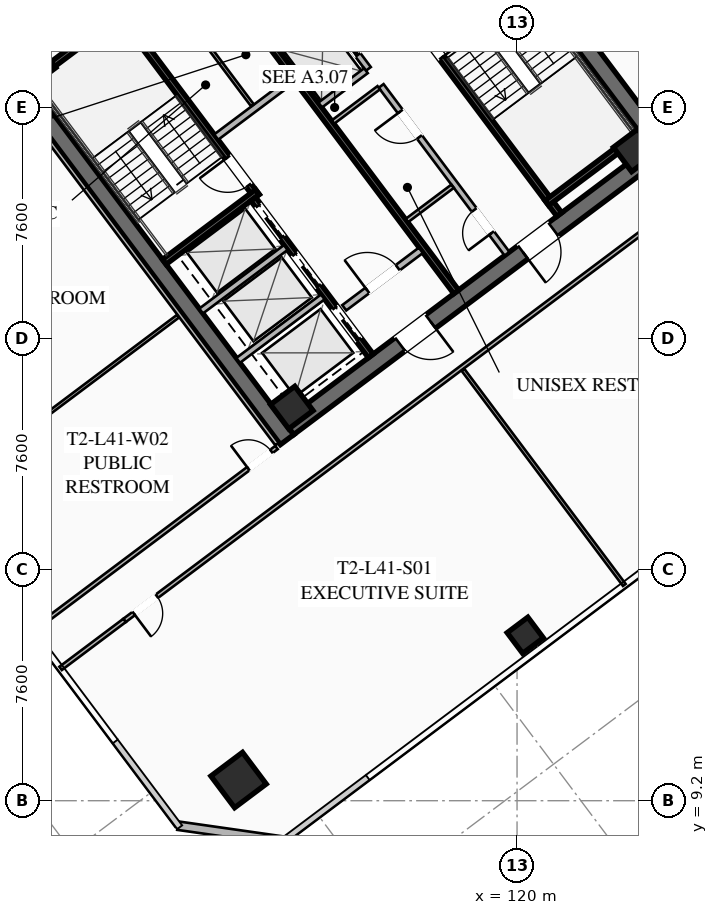
"""IFC4 building model, lengths in metres.
Left out: names, types, materials, properties, quantities, classifications, styles, units other than length and angle.
Written with IfcOpenShell. Run it as: python <this file> out.ifc"""

import sys

from ifc_helpers import new_model, si_unit, direction, frame, frame_2d, origin, origin_2d, place, context, subcontext, project, spatial, rectangle, hollow_rectangle, extrude, element, fill, save


model = new_model("IFC4")
c1 = context("Model", 3, precision=1e-05, world=origin(), true_north=direction((0.0, 1.0)))
c2 = subcontext(c1, "Body", "Model", "MODEL_VIEW")
j1 = project(units=[si_unit("LENGTHUNIT", "METRE"), si_unit("PLANEANGLEUNIT", "RADIAN")], contexts=[c1])
p1 = place(None, origin())
s1 = spatial("IfcSite", under=j1, at=p1, CompositionType="ELEMENT")
p2 = place(p1, origin())
s2 = spatial("IfcBuilding", under=s1, at=p2, CompositionType="ELEMENT")
p3 = place(p2, frame((0.0, 0.0, 153.45)))
s3 = spatial("IfcBuildingStorey", under=s2, at=p3, CompositionType="ELEMENT", Elevation=153.45)
for number, where, z_axis, x_axis in (
    (1, (112.436, 21.077, 0.0), (0.0, 0.0, 1.0), (-0.6, 0.8, 0.0)),
    (2, (115.564, 42.923, 0.0), (0.0, 0.0, 1.0), (0.6, -0.8, 0.0)),
):
    element("IfcWall", number, at=place(p3, frame(where, z_axis=z_axis, x_axis=x_axis)), inside=s3, PredefinedType="SHEAR", context=c2, shape_type="SweptSolid", body=[
        extrude(rectangle(XDim=15.6, YDim=0.55, at=frame_2d((7.8, 0.0))), origin(), (0.0, 0.0, 1.0), 3.55),
    ])
p4 = place(p3, frame((124.539, 30.498, 0.0), z_axis=(0.0, 0.0, 1.0), x_axis=(-0.799998054672, -0.600002593761, 0.0)))
e3 = element("IfcWall", 3, at=p4, inside=s3, PredefinedType="SHEAR", context=c2, shape_type="SweptSolid", body=[
    extrude(rectangle(XDim=15.06, YDim=0.55, at=frame_2d((7.53, 0.0))), origin(), (0.0, 0.0, 1.0), 3.55),
])
p5 = place(p4, frame((9.23, 0.0, 0.0)))
e4 = element("IfcOpeningElement", 4, at=p5, cuts=e3, PredefinedType="OPENING", context=c2, shape_type="SweptSolid", body=[
    extrude(rectangle(XDim=1.25, YDim=2.25, at=frame_2d((0.625, 1.125))), frame((0.0, 0.285, 0.0), z_axis=(0.0, -1.0, 0.0), x_axis=(1.0, 0.0, 0.0)), (0.0, 0.0, 1.0), 0.57),
])
p6 = place(p4, frame((4.18, 0.0, 0.0)))
e5 = element("IfcOpeningElement", 5, at=p6, cuts=e3, PredefinedType="OPENING", context=c2, shape_type="SweptSolid", body=[
    extrude(rectangle(XDim=1.25, YDim=2.25, at=frame_2d((0.625, 1.125))), frame((0.0, 0.285, 0.0), z_axis=(0.0, -1.0, 0.0), x_axis=(1.0, 0.0, 0.0)), (0.0, 0.0, 1.0), 0.57),
])
p7 = place(p3, frame((103.461, 33.502, 0.0), z_axis=(0.0, 0.0, 1.0), x_axis=(0.799998054672, 0.600002593761, 0.0)))
e6 = element("IfcWall", 6, at=p7, inside=s3, PredefinedType="SHEAR", context=c2, shape_type="SweptSolid", body=[
    extrude(rectangle(XDim=15.06, YDim=0.55, at=frame_2d((7.53, 0.0))), origin(), (0.0, 0.0, 1.0), 3.55),
])
p8 = place(p7, frame((4.58, 0.0, 0.0)))
e7 = element("IfcOpeningElement", 7, at=p8, cuts=e6, PredefinedType="OPENING", context=c2, shape_type="SweptSolid", body=[
    extrude(rectangle(XDim=1.25, YDim=2.25, at=frame_2d((0.625, 1.125))), frame((0.0, 0.285, 0.0), z_axis=(0.0, -1.0, 0.0), x_axis=(1.0, 0.0, 0.0)), (0.0, 0.0, 1.0), 0.57),
])
p9 = place(p7, frame((9.63, 0.0, 0.0)))
e8 = element("IfcOpeningElement", 8, at=p9, cuts=e6, PredefinedType="OPENING", context=c2, shape_type="SweptSolid", body=[
    extrude(rectangle(XDim=1.25, YDim=2.25, at=frame_2d((0.625, 1.125))), frame((0.0, 0.285, 0.0), z_axis=(0.0, -1.0, 0.0), x_axis=(1.0, 0.0, 0.0)), (0.0, 0.0, 1.0), 0.57),
])
for number, where, z_axis, x_axis in (
    (9, (112.59, 22.13, 0.0), (0.0, 0.0, 1.0), (0.8, 0.6, 0.0)),
    (10, (123.87, 30.59, 0.0), (0.0, 0.0, 1.0), (0.8, 0.6, 0.0)),
    (11, (104.13, 33.41, 0.0), (0.0, 0.0, 1.0), (0.8, 0.6, 0.0)),
):
    element("IfcColumn", number, at=place(p3, frame(where, z_axis=z_axis, x_axis=x_axis)), inside=s3, PredefinedType="COLUMN", context=c2, shape_type="SweptSolid", body=[
        extrude(hollow_rectangle(XDim=1.0, YDim=1.0, WallThickness=0.04, at=origin_2d()), origin(), (0.0, 0.0, 1.0), 3.37),
    ])
p10 = place(p3, frame((110.84, 9.88, 0.0), z_axis=(0.0, 0.0, 1.0), x_axis=(0.799999996291, 0.600000004945, 0.0)))
e12 = element("IfcColumn", 12, at=p10, inside=s3, PredefinedType="COLUMN", context=c2, shape_type="SweptSolid", body=[
    extrude(hollow_rectangle(XDim=1.3, YDim=1.3, WallThickness=0.05, at=origin_2d()), origin(), (0.0, 0.0, 1.0), 3.37),
])
p11 = place(p3, frame((120.27, 14.64, 0.0), z_axis=(0.0, 0.0, 1.0), x_axis=(0.799999996291, 0.600000004945, 0.0)))
e13 = element("IfcColumn", 13, at=p11, inside=s3, PredefinedType="COLUMN", context=c2, shape_type="SweptSolid", body=[
    extrude(hollow_rectangle(XDim=0.85, YDim=0.85, WallThickness=0.035, at=origin_2d()), origin(), (0.0, 0.0, 1.0), 3.37),
])
p12 = place(p3, frame((112.34, 7.88, 0.0), z_axis=(0.0, 0.0, 1.0), x_axis=(-0.989949493661, 0.141421356237, 0.0)))
e14 = element("IfcWall", 14, at=p12, inside=s3, PredefinedType="SOLIDWALL", context=c2, shape_type="SweptSolid", body=[
    extrude(rectangle(XDim=3.536, YDim=0.28, at=frame_2d((1.768, 0.0))), origin(), (0.0, 0.0, 1.0), 3.37),
])
p13 = place(p3, frame((111.44, 29.08, 0.0), z_axis=(0.0, 0.0, 1.0), x_axis=(-0.59999029481, 0.8000072788, 0.0)))
e15 = element("IfcWall", 15, at=p13, inside=s3, PredefinedType="SHEAR", context=c2, shape_type="SweptSolid", body=[
    extrude(rectangle(XDim=8.05, YDim=0.2, at=frame_2d((4.025, 0.0))), origin(), (0.0, 0.0, 1.0), 3.37),
])
p14 = place(p13, frame((0.45, 0.0, 0.0)))
e16 = element("IfcOpeningElement", 16, at=p14, cuts=e15, PredefinedType="OPENING", context=c2, shape_type="SweptSolid", body=[
    extrude(rectangle(XDim=1.15, YDim=2.2, at=frame_2d((0.575, 1.1))), frame((0.0, 0.11, 0.0), z_axis=(0.0, -1.0, 0.0), x_axis=(1.0, 0.0, 0.0)), (0.0, 0.0, 1.0), 0.22),
])
for number, where, z_axis, x_axis in (
    (17, (108.396, 26.922, 0.0), (0.0, 0.0, 1.0), (0.8, 0.6, 0.0)),
    (18, (103.956, 32.842, 0.0), (0.0, 0.0, 1.0), (0.8, 0.6, 0.0)),
):
    element("IfcWall", number, at=place(p3, frame(where, z_axis=z_axis, x_axis=x_axis)), inside=s3, PredefinedType="SHEAR", context=c2, shape_type="SweptSolid", body=[
        extrude(rectangle(XDim=3.83, YDim=0.2, at=frame_2d((1.915, 0.0))), origin(), (0.0, 0.0, 1.0), 3.37),
    ])
p15 = place(p3, frame((116.56, 34.92, 0.0), z_axis=(0.0, 0.0, 1.0), x_axis=(0.59999029481, -0.8000072788, 0.0)))
e19 = element("IfcWall", 19, at=p15, inside=s3, PredefinedType="SHEAR", context=c2, shape_type="SweptSolid", body=[
    extrude(rectangle(XDim=8.05, YDim=0.2, at=frame_2d((4.025, 0.0))), origin(), (0.0, 0.0, 1.0), 3.37),
])
p16 = place(p15, frame((0.45, 0.0, 0.0)))
e20 = element("IfcOpeningElement", 20, at=p16, cuts=e19, PredefinedType="OPENING", context=c2, shape_type="SweptSolid", body=[
    extrude(rectangle(XDim=1.15, YDim=2.2, at=frame_2d((0.575, 1.1))), frame((0.0, 0.11, 0.0), z_axis=(0.0, -1.0, 0.0), x_axis=(1.0, 0.0, 0.0)), (0.0, 0.0, 1.0), 0.22),
])
p17 = place(p3, frame((120.98, 28.86, 0.0), z_axis=(0.0, 0.0, 1.0), x_axis=(0.800015298837, 0.599979601008, 0.0)))
e21 = element("IfcWall", 21, at=p17, inside=s3, PredefinedType="SHEAR", context=c2, shape_type="SweptSolid", body=[
    extrude(rectangle(XDim=3.83, YDim=0.2, at=frame_2d((1.915, 0.0))), origin(), (0.0, 0.0, 1.0), 3.37),
])
p18 = place(p3, frame((117.998, 25.936, 0.0), z_axis=(0.0, 0.0, 1.0), x_axis=(-0.600002693989, 0.799997979501, 0.0)))
e22 = element("IfcWall", 22, at=p18, inside=s3, PredefinedType="SHEAR", context=c2, shape_type="SweptSolid", body=[
    extrude(rectangle(XDim=14.5, YDim=0.2, at=frame_2d((7.25, 0.0))), origin(), (0.0, 0.0, 1.0), 3.37),
])
p19 = place(p3, frame((110.104, 31.028, 0.0), z_axis=(0.0, 0.0, 1.0), x_axis=(0.800018601094, 0.59997519774, 0.0)))
e23 = element("IfcWall", 23, at=p19, inside=s3, PredefinedType="SOLIDWALL", context=c2, shape_type="SweptSolid", body=[
    extrude(rectangle(XDim=3.15, YDim=0.22, at=frame_2d((1.575, 0.0))), origin(), (0.0, 0.0, 1.0), 2.513),
])
p20 = place(p3, frame((114.316, 25.412, 0.0), z_axis=(0.0, 0.0, 1.0), x_axis=(0.800018601094, 0.59997519774, 0.0)))
e24 = element("IfcWall", 24, at=p20, inside=s3, PredefinedType="SOLIDWALL", context=c2, shape_type="SweptSolid", body=[
    extrude(rectangle(XDim=3.15, YDim=0.22, at=frame_2d((1.575, 0.0))), origin(), (0.0, 0.0, 1.0), 2.513),
])
p21 = place(p20, frame((0.95, 0.0, 0.0)))
e25 = element("IfcOpeningElement", 25, at=p21, cuts=e24, PredefinedType="OPENING", context=c2, shape_type="SweptSolid", body=[
    extrude(rectangle(XDim=1.25, YDim=2.25, at=frame_2d((0.625, 1.125))), frame((0.0, 0.12, 0.0), z_axis=(0.0, -1.0, 0.0), x_axis=(1.0, 0.0, 0.0)), (0.0, 0.0, 1.0), 0.24),
])
p22 = place(p3, frame((115.19, 23.83, 0.0), z_axis=(0.0, 0.0, 1.0), x_axis=(-0.599993943644, 0.800004542231, 0.0)))
e26 = element("IfcWall", 26, at=p22, inside=s3, PredefinedType="SHEAR", context=c2, shape_type="SweptSolid", body=[
    extrude(rectangle(XDim=6.45, YDim=0.2, at=frame_2d((3.225, 0.0))), origin(), (0.0, 0.0, 1.0), 3.37),
])
p23 = place(p22, frame((4.875, 0.0, 0.0)))
e27 = element("IfcOpeningElement", 27, at=p23, cuts=e26, PredefinedType="OPENING", context=c2, shape_type="SweptSolid", body=[
    extrude(rectangle(XDim=1.3, YDim=2.25, at=frame_2d((0.65, 1.125))), frame((0.0, 0.11, 0.0), z_axis=(0.0, -1.0, 0.0), x_axis=(1.0, 0.0, 0.0)), (0.0, 0.0, 1.0), 0.22),
])
p24 = place(p22, frame((2.875, 0.0, 0.0)))
e28 = element("IfcOpeningElement", 28, at=p24, cuts=e26, PredefinedType="OPENING", context=c2, shape_type="SweptSolid", body=[
    extrude(rectangle(XDim=1.3, YDim=2.25, at=frame_2d((0.65, 1.125))), frame((0.0, 0.11, 0.0), z_axis=(0.0, -1.0, 0.0), x_axis=(1.0, 0.0, 0.0)), (0.0, 0.0, 1.0), 0.22),
])
p25 = place(p22, frame((0.675, 0.0, 0.0)))
e29 = element("IfcOpeningElement", 29, at=p25, cuts=e26, PredefinedType="OPENING", context=c2, shape_type="SweptSolid", body=[
    extrude(rectangle(XDim=1.3, YDim=2.25, at=frame_2d((0.65, 1.125))), frame((0.0, 0.11, 0.0), z_axis=(0.0, -1.0, 0.0), x_axis=(1.0, 0.0, 0.0)), (0.0, 0.0, 1.0), 0.22),
])
for number, where, z_axis, x_axis in (
    (30, (110.826, 23.682, 0.0), (0.0, 0.0, 1.0), (0.8, 0.6, 0.0)),
    (31, (109.608, 25.306, 0.0), (0.0, 0.0, 1.0), (0.8, 0.6, 0.0)),
):
    element("IfcWall", number, at=place(p3, frame(where, z_axis=z_axis, x_axis=x_axis)), inside=s3, PredefinedType="SOLIDWALL", context=c2, shape_type="SweptSolid", body=[
        extrude(rectangle(XDim=3.48, YDim=0.2, at=frame_2d((1.74, 0.0))), origin(), (0.0, 0.0, 1.0), 3.37),
    ])
p26 = place(p3, frame((111.296, 32.072, 0.0), z_axis=(0.0, 0.0, 1.0), x_axis=(-0.59995887973, 0.800030838552, 0.0)))
e32 = element("IfcWall", 32, at=p26, inside=s3, PredefinedType="PARTITIONING", context=c2, shape_type="SweptSolid", body=[
    extrude(rectangle(XDim=3.8, YDim=0.11, at=frame_2d((1.9, 0.0))), origin(), (0.0, 0.0, 1.0), 2.513),
])
p27 = place(p3, frame((119.67, 27.19, 0.0), z_axis=(0.0, 0.0, 1.0), x_axis=(-0.599988677396, 0.800008491828, 0.0)))
e33 = element("IfcWall", 33, at=p27, inside=s3, PredefinedType="SOLIDWALL", context=c2, shape_type="SweptSolid", body=[
    extrude(rectangle(XDim=6.9, YDim=0.2, at=frame_2d((3.45, 0.0))), origin(), (0.0, 0.0, 1.0), 2.513),
])
p28 = place(p27, frame((0.85, 0.0, 0.0)))
e34 = element("IfcOpeningElement", 34, at=p28, cuts=e33, PredefinedType="OPENING", context=c2, shape_type="SweptSolid", body=[
    extrude(rectangle(XDim=0.95, YDim=2.05, at=frame_2d((0.475, 1.025))), frame((0.0, 0.11, 0.0), z_axis=(0.0, -1.0, 0.0), x_axis=(1.0, 0.0, 0.0)), (0.0, 0.0, 1.0), 0.22),
])
p29 = place(p27, frame((4.8, 0.0, 0.0)))
e35 = element("IfcOpeningElement", 35, at=p29, cuts=e33, PredefinedType="OPENING", context=c2, shape_type="SweptSolid", body=[
    extrude(rectangle(XDim=1.05, YDim=2.2, at=frame_2d((0.525, 1.1))), frame((0.0, 0.11, 0.0), z_axis=(0.0, -1.0, 0.0), x_axis=(1.0, 0.0, 0.0)), (0.0, 0.0, 1.0), 0.22),
])
for number, where, z_axis, x_axis in (
    (36, (113.946, 31.522, 0.0), (0.0, 0.0, 1.0), (0.8, 0.6, 0.0)),
    (37, (116.376, 28.282, 0.0), (0.0, 0.0, 1.0), (0.8, 0.6, 0.0)),
):
    element("IfcWall", number, at=place(p3, frame(where, z_axis=z_axis, x_axis=x_axis)), inside=s3, PredefinedType="PARTITIONING", context=c2, shape_type="SweptSolid", body=[
        extrude(rectangle(XDim=1.88, YDim=0.135, at=frame_2d((0.94, 0.0))), origin(), (0.0, 0.0, 1.0), 2.513),
    ])
p30 = place(p3, frame((115.11, 33.27, 0.0), z_axis=(0.0, 0.0, 1.0), x_axis=(-0.600011322243, 0.799991508192, 0.0)))
e38 = element("IfcWall", 38, at=p30, inside=s3, PredefinedType="SOLIDWALL", context=c2, shape_type="SweptSolid", body=[
    extrude(rectangle(XDim=6.9, YDim=0.2, at=frame_2d((3.45, 0.0))), origin(), (0.0, 0.0, 1.0), 3.37),
])
p31 = place(p30, frame((0.575, 0.0, 0.0)))
e39 = element("IfcOpeningElement", 39, at=p31, cuts=e38, PredefinedType="OPENING", context=c2, shape_type="SweptSolid", body=[
    extrude(rectangle(XDim=1.1, YDim=2.2, at=frame_2d((0.55, 1.1))), frame((0.0, 0.11, 0.0), z_axis=(0.0, -1.0, 0.0), x_axis=(1.0, 0.0, 0.0)), (0.0, 0.0, 1.0), 0.22),
])
p32 = place(p30, frame((2.825, 0.0, 0.0)))
e40 = element("IfcOpeningElement", 40, at=p32, cuts=e38, PredefinedType="OPENING", context=c2, shape_type="SweptSolid", body=[
    extrude(rectangle(XDim=1.1, YDim=2.2, at=frame_2d((0.55, 1.1))), frame((0.0, 0.11, 0.0), z_axis=(0.0, -1.0, 0.0), x_axis=(1.0, 0.0, 0.0)), (0.0, 0.0, 1.0), 0.22),
])
p33 = place(p30, frame((5.075, 0.0, 0.0)))
e41 = element("IfcOpeningElement", 41, at=p33, cuts=e38, PredefinedType="OPENING", context=c2, shape_type="SweptSolid", body=[
    extrude(rectangle(XDim=1.1, YDim=2.2, at=frame_2d((0.55, 1.1))), frame((0.0, 0.11, 0.0), z_axis=(0.0, -1.0, 0.0), x_axis=(1.0, 0.0, 0.0)), (0.0, 0.0, 1.0), 0.22),
])
p34 = place(p3, frame((113.526, 32.082, 0.0), z_axis=(0.0, 0.0, 1.0), x_axis=(0.800046745961, 0.599937666993, 0.0)))
e42 = element("IfcWall", 42, at=p34, inside=s3, PredefinedType="SOLIDWALL", context=c2, shape_type="SweptSolid", body=[
    extrude(rectangle(XDim=1.88, YDim=0.2, at=frame_2d((0.94, 0.0))), origin(), (0.0, 0.0, 1.0), 3.37),
])
p35 = place(p3, frame((112.176, 33.882, 0.0), z_axis=(0.0, 0.0, 1.0), x_axis=(0.8, 0.6, 0.0)))
e43 = element("IfcWall", 43, at=p35, inside=s3, PredefinedType="SOLIDWALL", context=c2, shape_type="SweptSolid", body=[
    extrude(rectangle(XDim=1.88, YDim=0.2, at=frame_2d((0.94, 0.0))), origin(), (0.0, 0.0, 1.0), 3.37),
])
p36 = place(p3, frame((94.568, 31.826, 0.0), z_axis=(0.0, 0.0, 1.0), x_axis=(0.799997191971, 0.600003744021, 0.0)))
e44 = element("IfcWall", 44, at=p36, inside=s3, PredefinedType="PARTITIONING", context=c2, shape_type="SweptSolid", body=[
    extrude(rectangle(XDim=31.3, YDim=0.135, at=frame_2d((15.65, 0.0))), origin(), (0.0, 0.0, 1.0), 2.513),
])
p37 = place(p36, frame((0.3, 0.0, 0.0)))
e45 = element("IfcOpeningElement", 45, at=p37, cuts=e44, PredefinedType="OPENING", context=c2, shape_type="SweptSolid", body=[
    extrude(rectangle(XDim=0.95, YDim=2.05, at=frame_2d((0.475, 1.025))), frame((0.0, 0.077, 0.0), z_axis=(0.0, -1.0, 0.0), x_axis=(1.0, 0.0, 0.0)), (0.0, 0.0, 1.0), 0.155),
])
p38 = place(p3, frame((132.13, 33.91, 0.0), z_axis=(0.0, 0.0, 1.0), x_axis=(-0.799997191971, -0.600003744021, 0.0)))
e46 = element("IfcWall", 46, at=p38, inside=s3, PredefinedType="PARTITIONING", context=c2, shape_type="SweptSolid", body=[
    extrude(rectangle(XDim=31.3, YDim=0.135, at=frame_2d((15.65, 0.0))), origin(), (0.0, 0.0, 1.0), 2.513),
])
p39 = place(p38, frame((29.97, 0.0, 0.0)))
e47 = element("IfcOpeningElement", 47, at=p39, cuts=e46, PredefinedType="OPENING", context=c2, shape_type="SweptSolid", body=[
    extrude(rectangle(XDim=0.95, YDim=2.05, at=frame_2d((0.475, 1.025))), frame((0.0, 0.077, 0.0), z_axis=(0.0, -1.0, 0.0), x_axis=(1.0, 0.0, 0.0)), (0.0, 0.0, 1.0), 0.155),
])
p40 = place(p38, frame((0.38, 0.0, 0.0)))
e48 = element("IfcOpeningElement", 48, at=p40, cuts=e46, PredefinedType="OPENING", context=c2, shape_type="SweptSolid", body=[
    extrude(rectangle(XDim=0.95, YDim=2.05, at=frame_2d((0.475, 1.025))), frame((0.0, 0.077, 0.0), z_axis=(0.0, -1.0, 0.0), x_axis=(1.0, 0.0, 0.0)), (0.0, 0.0, 1.0), 0.155),
])
p41 = place(p3, frame((104.986, 13.552, 0.0), z_axis=(0.0, 0.0, 1.0), x_axis=(0.80002227902, 0.599970293491, 0.0)))
e49 = element("IfcWall", 49, at=p41, inside=s3, PredefinedType="PARTITIONING", context=c2, shape_type="SweptSolid", body=[
    extrude(rectangle(XDim=2.63, YDim=0.135, at=frame_2d((1.315, 0.0))), origin(), (0.0, 0.0, 1.0), 2.513),
])
p42 = place(p3, frame((123.528, 16.296, 0.0), z_axis=(0.0, 0.0, 1.0), x_axis=(-0.6, 0.8, 0.0)))
e50 = element("IfcWall", 50, at=p42, inside=s3, PredefinedType="PARTITIONING", context=c2, shape_type="SweptSolid", body=[
    extrude(rectangle(XDim=8.85, YDim=0.11, at=frame_2d((4.425, 0.0))), origin(), (0.0, 0.0, 1.0), 2.513),
])
p43 = place(p3, frame((112.104, 20.928, 0.0), z_axis=(0.0, 0.0, 1.0), x_axis=(-0.599994940075, 0.800003794918, 0.0)))
e51 = element("IfcWall", 51, at=p43, inside=s3, PredefinedType="PARTITIONING", context=c2, shape_type="SweptSolid", body=[
    extrude(rectangle(XDim=15.44, YDim=0.135, at=frame_2d((7.72, 0.0))), origin(), (0.0, 0.0, 1.0), 2.513),
])
p44 = place(p3, frame((104.056, 14.792, 0.0), z_axis=(0.0, 0.0, 1.0), x_axis=(0.800002918023, 0.599996109283, 0.0)))
e52 = element("IfcWall", 52, at=p44, inside=s3, PredefinedType="PARTITIONING", context=c2, shape_type="SweptSolid", body=[
    extrude(rectangle(XDim=10.04, YDim=0.135, at=frame_2d((5.02, 0.0))), origin(), (0.0, 0.0, 1.0), 2.513),
])
p45 = place(p44, frame((8.88, 0.0, 0.0)))
e53 = element("IfcOpeningElement", 53, at=p45, cuts=e52, PredefinedType="OPENING", context=c2, shape_type="SweptSolid", body=[
    extrude(rectangle(XDim=0.95, YDim=2.05, at=frame_2d((0.475, 1.025))), frame((0.0, 0.077, 0.0), z_axis=(0.0, -1.0, 0.0), x_axis=(1.0, 0.0, 0.0)), (0.0, 0.0, 1.0), 0.155),
])
p46 = place(p3, frame((100.816, 19.112, 0.0), z_axis=(0.0, 0.0, 1.0), x_axis=(0.800002918023, 0.599996109283, 0.0)))
e54 = element("IfcWall", 54, at=p46, inside=s3, PredefinedType="PARTITIONING", context=c2, shape_type="SweptSolid", body=[
    extrude(rectangle(XDim=10.04, YDim=0.11, at=frame_2d((5.02, 0.0))), origin(), (0.0, 0.0, 1.0), 2.513),
])
p47 = place(p5, origin())
e55 = element("IfcDoor", 55, at=p47, inside=s3, OperationType="SINGLE_SWING_LEFT", PredefinedType="DOOR", context=c2, shape_type="SweptSolid", body=[
    extrude(rectangle(XDim=1.25, YDim=2.25, at=frame_2d((0.625, 1.125))), frame((0.0, 0.025, 0.0), z_axis=(0.0, -1.0, 0.0), x_axis=(1.0, 0.0, 0.0)), (0.0, 0.0, 1.0), 0.05),
])
fill(e4, e55)
p48 = place(p6, origin())
e56 = element("IfcDoor", 56, at=p48, inside=s3, OperationType="SINGLE_SWING_RIGHT", PredefinedType="DOOR", context=c2, shape_type="SweptSolid", body=[
    extrude(rectangle(XDim=1.25, YDim=2.25, at=frame_2d((0.625, 1.125))), frame((0.0, 0.025, 0.0), z_axis=(0.0, -1.0, 0.0), x_axis=(1.0, 0.0, 0.0)), (0.0, 0.0, 1.0), 0.05),
])
fill(e5, e56)
p49 = place(p14, origin())
e57 = element("IfcDoor", 57, at=p49, inside=s3, OperationType="SINGLE_SWING_RIGHT", PredefinedType="DOOR", context=c2, shape_type="SweptSolid", body=[
    extrude(rectangle(XDim=1.15, YDim=2.2, at=frame_2d((0.575, 1.1))), frame((0.0, 0.025, 0.0), z_axis=(0.0, -1.0, 0.0), x_axis=(1.0, 0.0, 0.0)), (0.0, 0.0, 1.0), 0.05),
])
fill(e16, e57)
p50 = place(p16, origin())
e58 = element("IfcDoor", 58, at=p50, inside=s3, OperationType="SINGLE_SWING_RIGHT", PredefinedType="DOOR", context=c2, shape_type="SweptSolid", body=[
    extrude(rectangle(XDim=1.15, YDim=2.2, at=frame_2d((0.575, 1.1))), frame((0.0, 0.025, 0.0), z_axis=(0.0, -1.0, 0.0), x_axis=(1.0, 0.0, 0.0)), (0.0, 0.0, 1.0), 0.05),
])
fill(e20, e58)
p51 = place(p21, origin())
e59 = element("IfcDoor", 59, at=p51, inside=s3, OperationType="SINGLE_SWING_LEFT", PredefinedType="DOOR", context=c2, shape_type="SweptSolid", body=[
    extrude(rectangle(XDim=1.25, YDim=2.25, at=frame_2d((0.625, 1.125))), frame((0.0, 0.025, 0.0), z_axis=(0.0, -1.0, 0.0), x_axis=(1.0, 0.0, 0.0)), (0.0, 0.0, 1.0), 0.05),
])
fill(e25, e59)
p52 = place(p28, origin())
e60 = element("IfcDoor", 60, at=p52, inside=s3, OperationType="SINGLE_SWING_LEFT", PredefinedType="DOOR", context=c2, shape_type="SweptSolid", body=[
    extrude(rectangle(XDim=0.95, YDim=2.05, at=frame_2d((0.475, 1.025))), frame((0.0, 0.025, 0.0), z_axis=(0.0, -1.0, 0.0), x_axis=(1.0, 0.0, 0.0)), (0.0, 0.0, 1.0), 0.05),
])
fill(e34, e60)
p53 = place(p29, origin())
e61 = element("IfcDoor", 61, at=p53, inside=s3, OperationType="SINGLE_SWING_RIGHT", PredefinedType="DOOR", context=c2, shape_type="SweptSolid", body=[
    extrude(rectangle(XDim=1.05, YDim=2.2, at=frame_2d((0.525, 1.1))), frame((0.0, 0.025, 0.0), z_axis=(0.0, -1.0, 0.0), x_axis=(1.0, 0.0, 0.0)), (0.0, 0.0, 1.0), 0.05),
])
fill(e35, e61)
p54 = place(p39, origin())
e62 = element("IfcDoor", 62, at=p54, inside=s3, OperationType="SINGLE_SWING_RIGHT", PredefinedType="DOOR", context=c2, shape_type="SweptSolid", body=[
    extrude(rectangle(XDim=0.95, YDim=2.05, at=frame_2d((0.475, 1.025))), frame((0.0, 0.025, 0.0), z_axis=(0.0, -1.0, 0.0), x_axis=(1.0, 0.0, 0.0)), (0.0, 0.0, 1.0), 0.05),
])
fill(e47, e62)
p55 = place(p45, origin())
e63 = element("IfcDoor", 63, at=p55, inside=s3, OperationType="SINGLE_SWING_LEFT", PredefinedType="DOOR", context=c2, shape_type="SweptSolid", body=[
    extrude(rectangle(XDim=0.95, YDim=2.05, at=frame_2d((0.475, 1.025))), frame((0.0, 0.025, 0.0), z_axis=(0.0, -1.0, 0.0), x_axis=(1.0, 0.0, 0.0)), (0.0, 0.0, 1.0), 0.05),
])
fill(e53, e63)
p56 = place(p23, origin())
e64 = element("IfcDoor", 64, at=p56, inside=s3, OperationType="SLIDING_TO_LEFT", PredefinedType="DOOR", context=c2, shape_type="SweptSolid", body=[
    extrude(rectangle(XDim=1.3, YDim=2.25, at=frame_2d((0.65, 1.125))), frame((0.0, 0.025, 0.0), z_axis=(0.0, -1.0, 0.0), x_axis=(1.0, 0.0, 0.0)), (0.0, 0.0, 1.0), 0.05),
])
fill(e27, e64)
p57 = place(p24, origin())
e65 = element("IfcDoor", 65, at=p57, inside=s3, OperationType="SLIDING_TO_LEFT", PredefinedType="DOOR", context=c2, shape_type="SweptSolid", body=[
    extrude(rectangle(XDim=1.3, YDim=2.25, at=frame_2d((0.65, 1.125))), frame((0.0, 0.025, 0.0), z_axis=(0.0, -1.0, 0.0), x_axis=(1.0, 0.0, 0.0)), (0.0, 0.0, 1.0), 0.05),
])
fill(e28, e65)
p58 = place(p25, origin())
e66 = element("IfcDoor", 66, at=p58, inside=s3, OperationType="SLIDING_TO_LEFT", PredefinedType="DOOR", context=c2, shape_type="SweptSolid", body=[
    extrude(rectangle(XDim=1.3, YDim=2.25, at=frame_2d((0.65, 1.125))), frame((0.0, 0.025, 0.0), z_axis=(0.0, -1.0, 0.0), x_axis=(1.0, 0.0, 0.0)), (0.0, 0.0, 1.0), 0.05),
])
fill(e29, e66)
p59 = place(p31, origin())
e67 = element("IfcDoor", 67, at=p59, inside=s3, OperationType="SLIDING_TO_LEFT", PredefinedType="DOOR", context=c2, shape_type="SweptSolid", body=[
    extrude(rectangle(XDim=1.1, YDim=2.2, at=frame_2d((0.55, 1.1))), frame((0.0, 0.025, 0.0), z_axis=(0.0, -1.0, 0.0), x_axis=(1.0, 0.0, 0.0)), (0.0, 0.0, 1.0), 0.05),
])
fill(e39, e67)
save(model, sys.argv[1])
